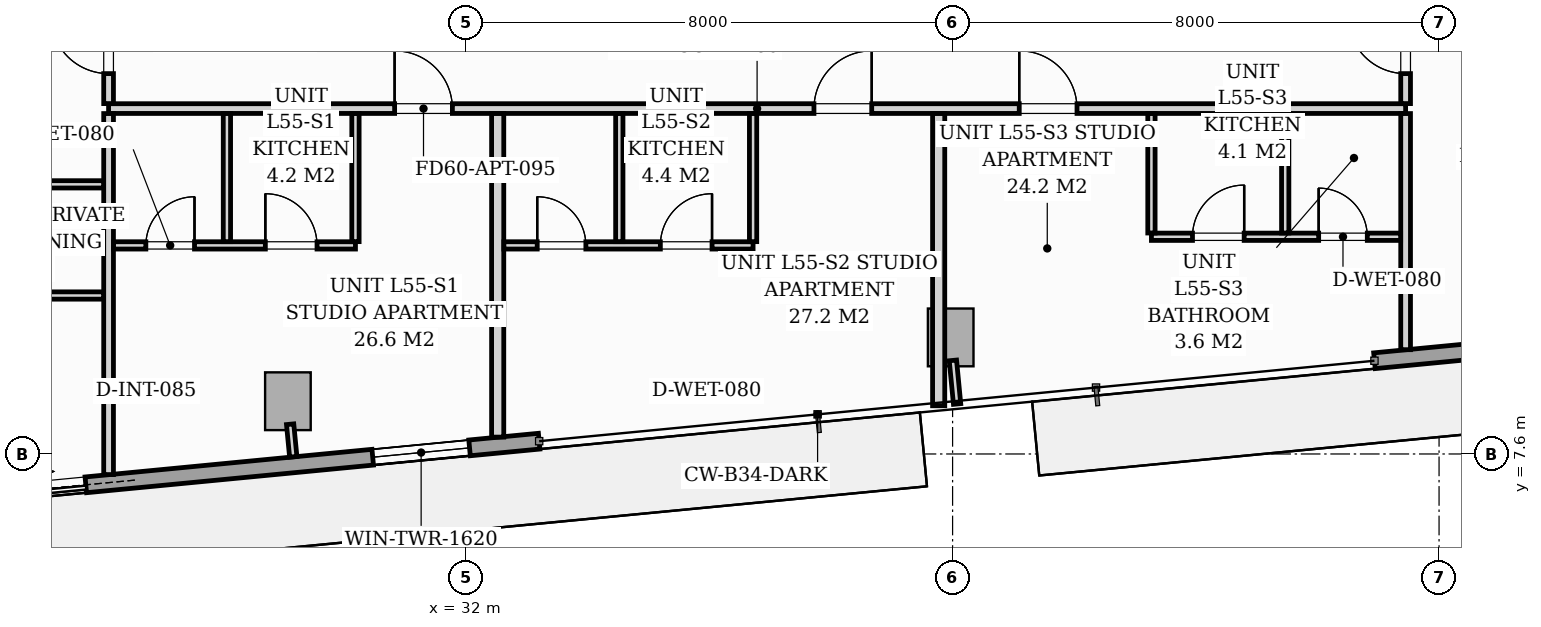
"""IFC4 building model, lengths in metres.
Left out: names, types, materials, properties, quantities, classifications, styles, units other than length and angle.
Written with IfcOpenShell. Run it as: python <this file> out.ifc"""

import sys

from ifc_helpers import new_model, si_unit, direction, frame, frame_2d, origin, origin_2d, place, context, subcontext, project, spatial, rectangle, extrude, source, transform, mapped, element, fill, save


model = new_model("IFC4")
c1 = context("Model", 3, precision=1e-05, world=origin(), true_north=direction((0.0, 1.0)))
c2 = subcontext(c1, "Body", "Model", "MODEL_VIEW")
j1 = project(units=[si_unit("LENGTHUNIT", "METRE"), si_unit("PLANEANGLEUNIT", "RADIAN")], contexts=[c1])
p1 = place(None, origin())
s1 = spatial("IfcSite", under=j1, at=p1, CompositionType="ELEMENT")
p2 = place(p1, origin())
s2 = spatial("IfcBuilding", under=s1, at=p2, CompositionType="ELEMENT")
p3 = place(p2, frame((0.0, 0.0, 192.2)))
s3 = spatial("IfcBuildingStorey", under=s2, at=p3, CompositionType="ELEMENT", Elevation=192.2)
m1 = source(origin(), c2, "Body", "SweptSolid", [
    extrude(rectangle(XDim=0.75, YDim=0.95, at=origin_2d()), origin(), (0.0, 0.0, 1.0), 3.196),
])
for number, where, z_axis, x_axis in (
    (1, (29.069, 8.467, 0.002), (0.0, 0.0, 1.0), (0.995, 0.096, 0.0)),
    (2, (39.969, 9.517, 0.002), (0.0, 0.0, 1.0), (0.995, 0.096, 0.0)),
):
    element("IfcColumn", number, at=place(p3, frame(where, z_axis=z_axis, x_axis=x_axis)), inside=s3, PredefinedType="COLUMN", context=c2, shape_type="MappedRepresentation", body=[
        mapped(m1, transform((0.0, 0.0, 0.0), scale=1.0)),
    ])
p4 = place(p3, frame((62.963, 10.676, 0.0), z_axis=(0.0, 0.0, 1.0), x_axis=(-0.995395627913, -0.095851676732, 0.0)))
e3 = element("IfcWall", 3, at=p4, inside=s3, PredefinedType="STANDARD", context=c2, shape_type="SweptSolid", body=[
    extrude(rectangle(XDim=16.1, YDim=0.26, at=frame_2d((8.05, 0.0))), origin(), (0.0, 0.0, 1.0), 2.94),
])
p5 = place(p4, frame((8.192, 0.0, 0.0)))
e4 = element("IfcOpeningElement", 4, at=p5, cuts=e3, PredefinedType="OPENING", context=c2, shape_type="SweptSolid", body=[
    extrude(rectangle(XDim=1.8, YDim=2.06, at=frame_2d((0.9, 1.03))), frame((0.0, 0.14, 0.0), z_axis=(0.0, -1.0, 0.0), x_axis=(1.0, 0.0, 0.0)), (0.0, 0.0, 1.0), 0.28),
])
p6 = place(p4, frame((2.05, 0.0, 0.65)))
e5 = element("IfcOpeningElement", 5, at=p6, cuts=e3, PredefinedType="OPENING", context=c2, shape_type="SweptSolid", body=[
    extrude(rectangle(XDim=1.6, YDim=1.5, at=frame_2d((0.8, 0.75))), frame((0.0, 0.14, 0.0), z_axis=(0.0, -1.0, 0.0), x_axis=(1.0, 0.0, 0.0)), (0.0, 0.0, 1.0), 0.28),
])
p7 = place(p3, frame((33.201, 7.81, 0.0), z_axis=(0.0, 0.0, 1.0), x_axis=(-0.995397074604, -0.095836652014, 0.0)))
e6 = element("IfcWall", 6, at=p7, inside=s3, PredefinedType="STANDARD", context=c2, shape_type="SweptSolid", body=[
    extrude(rectangle(XDim=16.1, YDim=0.26, at=frame_2d((8.05, 0.0))), origin(), (0.0, 0.0, 1.0), 2.94),
])
p8 = place(p7, frame((7.49, 0.0, 0.0)))
e7 = element("IfcOpeningElement", 7, at=p8, cuts=e6, PredefinedType="OPENING", context=c2, shape_type="SweptSolid", body=[
    extrude(rectangle(XDim=1.8, YDim=2.06, at=frame_2d((0.9, 1.03))), frame((0.0, 0.14, 0.0), z_axis=(0.0, -1.0, 0.0), x_axis=(1.0, 0.0, 0.0)), (0.0, 0.0, 1.0), 0.28),
])
p9 = place(p7, frame((1.15, 0.0, 0.65)))
e8 = element("IfcOpeningElement", 8, at=p9, cuts=e6, PredefinedType="OPENING", context=c2, shape_type="SweptSolid", body=[
    extrude(rectangle(XDim=1.6, YDim=1.5, at=frame_2d((0.8, 0.75))), frame((0.0, 0.14, 0.0), z_axis=(0.0, -1.0, 0.0), x_axis=(1.0, 0.0, 0.0)), (0.0, 0.0, 1.0), 0.28),
])
p10 = place(p3, frame((26.12, 13.28, 0.0), z_axis=(0.0, 0.0, 1.0), x_axis=(1.0, 0.0, 0.0)))
e9 = element("IfcWall", 9, at=p10, inside=s3, PredefinedType="PARTITIONING", context=c2, shape_type="SweptSolid", body=[
    extrude(rectangle(XDim=21.33, YDim=0.16, at=frame_2d((10.665, 0.0))), origin(), (0.0, 0.0, 1.0), 2.94),
])
p11 = place(p10, frame((4.704, 0.0, 0.0)))
e10 = element("IfcOpeningElement", 10, at=p11, cuts=e9, PredefinedType="OPENING", context=c2, shape_type="SweptSolid", body=[
    extrude(rectangle(XDim=0.95, YDim=2.06, at=frame_2d((0.475, 1.03))), frame((0.0, 0.09, 0.0), z_axis=(0.0, -1.0, 0.0), x_axis=(1.0, 0.0, 0.0)), (0.0, 0.0, 1.0), 0.18),
])
p12 = place(p10, frame((11.6, 0.0, 0.0)))
e11 = element("IfcOpeningElement", 11, at=p12, cuts=e9, PredefinedType="OPENING", context=c2, shape_type="SweptSolid", body=[
    extrude(rectangle(XDim=0.95, YDim=2.06, at=frame_2d((0.475, 1.03))), frame((0.0, 0.09, 0.0), z_axis=(0.0, -1.0, 0.0), x_axis=(1.0, 0.0, 0.0)), (0.0, 0.0, 1.0), 0.18),
])
p13 = place(p10, frame((14.976, 0.0, 0.0)))
e12 = element("IfcOpeningElement", 12, at=p13, cuts=e9, PredefinedType="OPENING", context=c2, shape_type="SweptSolid", body=[
    extrude(rectangle(XDim=0.95, YDim=2.06, at=frame_2d((0.475, 1.03))), frame((0.0, 0.09, 0.0), z_axis=(0.0, -1.0, 0.0), x_axis=(1.0, 0.0, 0.0)), (0.0, 0.0, 1.0), 0.18),
])
p14 = place(p3, frame((26.12, 7.261, 0.0), z_axis=(0.0, 0.0, 1.0), x_axis=(0.0, 1.0, 0.0)))
e13 = element("IfcWall", 13, at=p14, inside=s3, PredefinedType="PARTITIONING", context=c2, shape_type="SweptSolid", body=[
    extrude(rectangle(XDim=5.937, YDim=0.16, at=frame_2d((2.968, 0.0))), origin(), (0.0, 0.0, 1.0), 2.94),
])
p15 = place(p3, frame((26.12, 13.362, 0.0), z_axis=(0.0, 0.0, 1.0), x_axis=(0.0, 1.0, 0.0)))
e14 = element("IfcWall", 14, at=p15, inside=s3, PredefinedType="PARTITIONING", context=c2, shape_type="SweptSolid", body=[
    extrude(rectangle(XDim=4.44, YDim=0.16, at=frame_2d((2.22, 0.0))), origin(), (0.0, 0.0, 1.0), 2.94),
])
p16 = place(p15, frame((0.493, 0.0, 0.0)))
e15 = element("IfcOpeningElement", 15, at=p16, cuts=e14, PredefinedType="OPENING", context=c2, shape_type="SweptSolid", body=[
    extrude(rectangle(XDim=0.95, YDim=2.06, at=frame_2d((0.475, 1.03))), frame((0.0, 0.09, 0.0), z_axis=(0.0, -1.0, 0.0), x_axis=(1.0, 0.0, 0.0)), (0.0, 0.0, 1.0), 0.18),
])
p17 = place(p3, frame((47.45, 9.315, 0.0), z_axis=(0.0, 0.0, 1.0), x_axis=(0.0, 1.0, 0.0)))
e16 = element("IfcWall", 16, at=p17, inside=s3, PredefinedType="PARTITIONING", context=c2, shape_type="SweptSolid", body=[
    extrude(rectangle(XDim=3.883, YDim=0.16, at=frame_2d((1.941, 0.0))), origin(), (0.0, 0.0, 1.0), 2.94),
])
p18 = place(p3, frame((47.45, 13.362, 0.0), z_axis=(0.0, 0.0, 1.0), x_axis=(0.0, 1.0, 0.0)))
e17 = element("IfcWall", 17, at=p18, inside=s3, PredefinedType="PARTITIONING", context=c2, shape_type="SweptSolid", body=[
    extrude(rectangle(XDim=7.288, YDim=0.16, at=frame_2d((3.644, 0.0))), origin(), (0.0, 0.0, 1.0), 2.94),
])
p19 = place(p18, frame((0.493, 0.0, 0.0)))
e18 = element("IfcOpeningElement", 18, at=p19, cuts=e17, PredefinedType="OPENING", context=c2, shape_type="SweptSolid", body=[
    extrude(rectangle(XDim=0.95, YDim=2.06, at=frame_2d((0.475, 1.03))), frame((0.0, 0.09, 0.0), z_axis=(0.0, -1.0, 0.0), x_axis=(1.0, 0.0, 0.0)), (0.0, 0.0, 1.0), 0.18),
])
p20 = place(p18, frame((4.783, 0.0, 0.0)))
e19 = element("IfcOpeningElement", 19, at=p20, cuts=e17, PredefinedType="OPENING", context=c2, shape_type="SweptSolid", body=[
    extrude(rectangle(XDim=0.95, YDim=2.06, at=frame_2d((0.475, 1.03))), frame((0.0, 0.09, 0.0), z_axis=(0.0, -1.0, 0.0), x_axis=(1.0, 0.0, 0.0)), (0.0, 0.0, 1.0), 0.18),
])
p21 = place(p3, frame((26.202, 11.03, 0.0), z_axis=(0.0, 0.0, 1.0), x_axis=(1.0, 0.0, 0.0)))
e20 = element("IfcWall", 20, at=p21, inside=s3, PredefinedType="PARTITIONING", context=c2, shape_type="SweptSolid", body=[
    extrude(rectangle(XDim=3.978, YDim=0.12, at=frame_2d((1.989, 0.0))), origin(), (0.0, 0.0, 1.0), 2.94),
])
p22 = place(p21, frame((0.531, 0.0, 0.0)))
e21 = element("IfcOpeningElement", 21, at=p22, cuts=e20, PredefinedType="OPENING", context=c2, shape_type="SweptSolid", body=[
    extrude(rectangle(XDim=0.8, YDim=2.02, at=frame_2d((0.4, 1.01))), frame((0.0, 0.07, 0.0), z_axis=(0.0, -1.0, 0.0), x_axis=(1.0, 0.0, 0.0)), (0.0, 0.0, 1.0), 0.14),
])
p23 = place(p21, frame((2.496, 0.0, 0.0)))
e22 = element("IfcOpeningElement", 22, at=p23, cuts=e20, PredefinedType="OPENING", context=c2, shape_type="SweptSolid", body=[
    extrude(rectangle(XDim=0.85, YDim=2.05, at=frame_2d((0.425, 1.025))), frame((0.0, 0.07, 0.0), z_axis=(0.0, -1.0, 0.0), x_axis=(1.0, 0.0, 0.0)), (0.0, 0.0, 1.0), 0.14),
])
for number, where, z_axis, x_axis in (
    (23, (30.18, 11.092, 0.0), (0.0, 0.0, 1.0), (0.0, 1.0, 0.0)),
    (24, (28.066, 11.092, 0.0), (0.0, 0.0, 1.0), (0.0, 1.0, 0.0)),
):
    element("IfcWall", number, at=place(p3, frame(where, z_axis=z_axis, x_axis=x_axis)), inside=s3, PredefinedType="PARTITIONING", context=c2, shape_type="SweptSolid", body=[
        extrude(rectangle(XDim=2.106, YDim=0.12, at=frame_2d((1.053, 0.0))), origin(), (0.0, 0.0, 1.0), 2.94),
    ])
p24 = place(p3, frame((32.519, 7.877, 0.0), z_axis=(0.0, 0.0, 1.0), x_axis=(0.0, 1.0, 0.0)))
e25 = element("IfcWall", 25, at=p24, inside=s3, PredefinedType="PARTITIONING", context=c2, shape_type="SweptSolid", body=[
    extrude(rectangle(XDim=5.321, YDim=0.2, at=frame_2d((2.66, 0.0))), origin(), (0.0, 0.0, 1.0), 2.94),
])
p25 = place(p3, frame((32.621, 11.03, 0.0), z_axis=(0.0, 0.0, 1.0), x_axis=(1.0, 0.0, 0.0)))
e26 = element("IfcWall", 26, at=p25, inside=s3, PredefinedType="PARTITIONING", context=c2, shape_type="SweptSolid", body=[
    extrude(rectangle(XDim=4.098, YDim=0.12, at=frame_2d((2.049, 0.0))), origin(), (0.0, 0.0, 1.0), 2.94),
])
p26 = place(p25, frame((0.548, 0.0, 0.0)))
e27 = element("IfcOpeningElement", 27, at=p26, cuts=e26, PredefinedType="OPENING", context=c2, shape_type="SweptSolid", body=[
    extrude(rectangle(XDim=0.8, YDim=2.02, at=frame_2d((0.4, 1.01))), frame((0.0, 0.07, 0.0), z_axis=(0.0, -1.0, 0.0), x_axis=(1.0, 0.0, 0.0)), (0.0, 0.0, 1.0), 0.14),
])
p27 = place(p25, frame((2.573, 0.0, 0.0)))
e28 = element("IfcOpeningElement", 28, at=p27, cuts=e26, PredefinedType="OPENING", context=c2, shape_type="SweptSolid", body=[
    extrude(rectangle(XDim=0.85, YDim=2.05, at=frame_2d((0.425, 1.025))), frame((0.0, 0.07, 0.0), z_axis=(0.0, -1.0, 0.0), x_axis=(1.0, 0.0, 0.0)), (0.0, 0.0, 1.0), 0.14),
])
for number, where, z_axis, x_axis in (
    (29, (36.719, 11.092, 0.0), (0.0, 0.0, 1.0), (0.0, 1.0, 0.0)),
    (30, (34.519, 11.092, 0.0), (0.0, 0.0, 1.0), (0.0, 1.0, 0.0)),
):
    element("IfcWall", number, at=place(p3, frame(where, z_axis=z_axis, x_axis=x_axis)), inside=s3, PredefinedType="PARTITIONING", context=c2, shape_type="SweptSolid", body=[
        extrude(rectangle(XDim=2.106, YDim=0.12, at=frame_2d((1.053, 0.0))), origin(), (0.0, 0.0, 1.0), 2.94),
    ])
p28 = place(p3, frame((39.771, 8.393, 0.0), z_axis=(0.0, 0.0, 1.0), x_axis=(0.0, 1.0, 0.0)))
e31 = element("IfcWall", 31, at=p28, inside=s3, PredefinedType="PARTITIONING", context=c2, shape_type="SweptSolid", body=[
    extrude(rectangle(XDim=4.805, YDim=0.2, at=frame_2d((2.403, 0.0))), origin(), (0.0, 0.0, 1.0), 2.94),
])
p29 = place(p3, frame((43.27, 11.172, 0.0), z_axis=(0.0, 0.0, 1.0), x_axis=(1.0, 0.0, 0.0)))
e32 = element("IfcWall", 32, at=p29, inside=s3, PredefinedType="PARTITIONING", context=c2, shape_type="SweptSolid", body=[
    extrude(rectangle(XDim=4.098, YDim=0.12, at=frame_2d((2.049, 0.0))), origin(), (0.0, 0.0, 1.0), 2.94),
])
p30 = place(p29, frame((0.675, 0.0, 0.0)))
e33 = element("IfcOpeningElement", 33, at=p30, cuts=e32, PredefinedType="OPENING", context=c2, shape_type="SweptSolid", body=[
    extrude(rectangle(XDim=0.85, YDim=2.05, at=frame_2d((0.425, 1.025))), frame((0.0, 0.07, 0.0), z_axis=(0.0, -1.0, 0.0), x_axis=(1.0, 0.0, 0.0)), (0.0, 0.0, 1.0), 0.14),
])
p31 = place(p29, frame((2.75, 0.0, 0.0)))
e34 = element("IfcOpeningElement", 34, at=p31, cuts=e32, PredefinedType="OPENING", context=c2, shape_type="SweptSolid", body=[
    extrude(rectangle(XDim=0.8, YDim=2.02, at=frame_2d((0.4, 1.01))), frame((0.0, 0.07, 0.0), z_axis=(0.0, -1.0, 0.0), x_axis=(1.0, 0.0, 0.0)), (0.0, 0.0, 1.0), 0.14),
])
for number, where, z_axis, x_axis in (
    (35, (43.27, 11.234, 0.0), (0.0, 0.0, 1.0), (0.0, 1.0, 0.0)),
    (36, (45.47, 11.234, 0.0), (0.0, 0.0, 1.0), (0.0, 1.0, 0.0)),
):
    element("IfcWall", number, at=place(p3, frame(where, z_axis=z_axis, x_axis=x_axis)), inside=s3, PredefinedType="PARTITIONING", context=c2, shape_type="SweptSolid", body=[
        extrude(rectangle(XDim=1.964, YDim=0.12, at=frame_2d((0.982, 0.0))), origin(), (0.0, 0.0, 1.0), 2.94),
    ])
p32 = place(p3, frame((14.365, 10.206, 0.0), z_axis=(0.0, 0.0, 1.0), x_axis=(1.0, 0.0, 0.0)))
e37 = element("IfcWall", 37, at=p32, inside=s3, PredefinedType="PARTITIONING", context=c2, shape_type="SweptSolid", body=[
    extrude(rectangle(XDim=11.673, YDim=0.12, at=frame_2d((5.837, 0.0))), origin(), (0.0, 0.0, 1.0), 2.94),
])
p33 = place(p32, frame((5.405, 0.0, 0.0)))
e38 = element("IfcOpeningElement", 38, at=p33, cuts=e37, PredefinedType="OPENING", context=c2, shape_type="SweptSolid", body=[
    extrude(rectangle(XDim=0.85, YDim=2.05, at=frame_2d((0.425, 1.025))), frame((0.0, 0.07, 0.0), z_axis=(0.0, -1.0, 0.0), x_axis=(1.0, 0.0, 0.0)), (0.0, 0.0, 1.0), 0.14),
])
p34 = place(p3, frame((14.189, 12.034, 0.0), z_axis=(0.0, 0.0, 1.0), x_axis=(1.0, 0.0, 0.0)))
e39 = element("IfcWall", 39, at=p34, inside=s3, PredefinedType="PARTITIONING", context=c2, shape_type="SweptSolid", body=[
    extrude(rectangle(XDim=11.849, YDim=0.12, at=frame_2d((5.925, 0.0))), origin(), (0.0, 0.0, 1.0), 2.94),
])
p35 = place(p34, frame((5.493, 0.0, 0.0)))
e40 = element("IfcOpeningElement", 40, at=p35, cuts=e39, PredefinedType="OPENING", context=c2, shape_type="SweptSolid", body=[
    extrude(rectangle(XDim=0.85, YDim=2.05, at=frame_2d((0.425, 1.025))), frame((0.0, 0.07, 0.0), z_axis=(0.0, -1.0, 0.0), x_axis=(1.0, 0.0, 0.0)), (0.0, 0.0, 1.0), 0.14),
])
p36 = place(p3, frame((29.105, 8.089, 0.0), z_axis=(0.0, 0.0, 1.0), x_axis=(0.095772948675, -0.995403205893, 0.0)))
e41 = element("IfcWall", 41, at=p36, inside=s3, PredefinedType="PARTITIONING", context=c2, shape_type="SweptSolid", body=[
    extrude(rectangle(XDim=0.538, YDim=0.12, at=frame_2d((0.269, 0.0))), origin(), (0.0, 0.0, 1.0), 2.94),
])
p37 = place(p3, frame((40.005, 9.139, 0.0), z_axis=(0.0, 0.0, 1.0), x_axis=(0.095977354523, -0.995383517755, 0.0)))
e42 = element("IfcWall", 42, at=p37, inside=s3, PredefinedType="PARTITIONING", context=c2, shape_type="SweptSolid", body=[
    extrude(rectangle(XDim=0.72, YDim=0.12, at=frame_2d((0.36, 0.0))), origin(), (0.0, 0.0, 1.0), 2.94),
])
m2 = source(origin(), c2, "Body", "SweptSolid", [
    extrude(rectangle(XDim=1.8, YDim=2.06, at=frame_2d((0.9, 1.03))), frame((0.0, 0.025, 0.0), z_axis=(0.0, -1.0, 0.0), x_axis=(1.0, 0.0, 0.0)), (0.0, 0.0, 1.0), 0.05),
])
p38 = place(p8, origin())
e43 = element("IfcDoor", 43, at=p38, inside=s3, OperationType="SLIDING_TO_LEFT", PredefinedType="DOOR", context=c2, shape_type="MappedRepresentation", body=[
    mapped(m2, transform((0.0, 0.0, 0.0), scale=1.0)),
])
fill(e7, e43)
m3 = source(origin(), c2, "Body", "SweptSolid", [
    extrude(rectangle(XDim=1.6, YDim=1.5, at=frame_2d((0.8, 0.75))), frame((0.0, 0.03, 0.0), z_axis=(0.0, -1.0, 0.0), x_axis=(1.0, 0.0, 0.0)), (0.0, 0.0, 1.0), 0.06),
])
p39 = place(p9, origin())
e44 = element("IfcWindow", 44, at=p39, inside=s3, PartitioningType="SINGLE_PANEL", PredefinedType="WINDOW", context=c2, shape_type="MappedRepresentation", body=[
    mapped(m3, transform((0.0, 0.0, 0.0), scale=1.0)),
])
fill(e8, e44)
m4 = source(origin(), c2, "Body", "SweptSolid", [
    extrude(rectangle(XDim=0.95, YDim=2.06, at=frame_2d((0.475, 1.03))), frame((0.0, 0.025, 0.0), z_axis=(0.0, -1.0, 0.0), x_axis=(1.0, 0.0, 0.0)), (0.0, 0.0, 1.0), 0.05),
])
p40 = place(p11, origin())
e45 = element("IfcDoor", 45, at=p40, inside=s3, OperationType="SINGLE_SWING_LEFT", PredefinedType="DOOR", context=c2, shape_type="MappedRepresentation", body=[
    mapped(m4, transform((0.0, 0.0, 0.0), scale=1.0)),
])
fill(e10, e45)
m5 = source(origin(), c2, "Body", "SweptSolid", [
    extrude(rectangle(XDim=0.8, YDim=2.02, at=frame_2d((0.4, 1.01))), frame((0.0, 0.025, 0.0), z_axis=(0.0, -1.0, 0.0), x_axis=(1.0, 0.0, 0.0)), (0.0, 0.0, 1.0), 0.05),
])
p41 = place(p22, origin())
e46 = element("IfcDoor", 46, at=p41, inside=s3, OperationType="SINGLE_SWING_RIGHT", PredefinedType="DOOR", context=c2, shape_type="MappedRepresentation", body=[
    mapped(m5, transform((0.0, 0.0, 0.0), scale=1.0)),
])
fill(e21, e46)
m6 = source(origin(), c2, "Body", "SweptSolid", [
    extrude(rectangle(XDim=0.85, YDim=2.05, at=frame_2d((0.425, 1.025))), frame((0.0, 0.025, 0.0), z_axis=(0.0, -1.0, 0.0), x_axis=(1.0, 0.0, 0.0)), (0.0, 0.0, 1.0), 0.05),
])
p42 = place(p23, origin())
e47 = element("IfcDoor", 47, at=p42, inside=s3, OperationType="SINGLE_SWING_LEFT", PredefinedType="DOOR", context=c2, shape_type="MappedRepresentation", body=[
    mapped(m6, transform((0.0, 0.0, 0.0), scale=1.0)),
])
fill(e22, e47)
p43 = place(p12, origin())
e48 = element("IfcDoor", 48, at=p43, inside=s3, OperationType="SINGLE_SWING_RIGHT", PredefinedType="DOOR", context=c2, shape_type="MappedRepresentation", body=[
    mapped(m4, transform((0.0, 0.0, 0.0), scale=1.0)),
])
fill(e11, e48)
p44 = place(p26, origin())
e49 = element("IfcDoor", 49, at=p44, inside=s3, OperationType="SINGLE_SWING_LEFT", PredefinedType="DOOR", context=c2, shape_type="MappedRepresentation", body=[
    mapped(m5, transform((0.0, 0.0, 0.0), scale=1.0)),
])
fill(e27, e49)
p45 = place(p27, origin())
e50 = element("IfcDoor", 50, at=p45, inside=s3, OperationType="SINGLE_SWING_RIGHT", PredefinedType="DOOR", context=c2, shape_type="MappedRepresentation", body=[
    mapped(m6, transform((0.0, 0.0, 0.0), scale=1.0)),
])
fill(e28, e50)
p46 = place(p13, origin())
e51 = element("IfcDoor", 51, at=p46, inside=s3, OperationType="SINGLE_SWING_LEFT", PredefinedType="DOOR", context=c2, shape_type="MappedRepresentation", body=[
    mapped(m4, transform((0.0, 0.0, 0.0), scale=1.0)),
])
fill(e12, e51)
p47 = place(p30, origin())
e52 = element("IfcDoor", 52, at=p47, inside=s3, OperationType="SINGLE_SWING_RIGHT", PredefinedType="DOOR", context=c2, shape_type="MappedRepresentation", body=[
    mapped(m6, transform((0.0, 0.0, 0.0), scale=1.0)),
])
fill(e33, e52)
p48 = place(p31, origin())
e53 = element("IfcDoor", 53, at=p48, inside=s3, OperationType="SINGLE_SWING_LEFT", PredefinedType="DOOR", context=c2, shape_type="MappedRepresentation", body=[
    mapped(m5, transform((0.0, 0.0, 0.0), scale=1.0)),
])
fill(e34, e53)
p49 = place(p16, origin())
e54 = element("IfcDoor", 54, at=p49, inside=s3, OperationType="SINGLE_SWING_RIGHT", PredefinedType="DOOR", context=c2, shape_type="MappedRepresentation", body=[
    mapped(m4, transform((0.0, 0.0, 0.0), scale=1.0)),
])
fill(e15, e54)
p50 = place(p19, origin())
e55 = element("IfcDoor", 55, at=p50, inside=s3, OperationType="SINGLE_SWING_RIGHT", PredefinedType="DOOR", context=c2, shape_type="MappedRepresentation", body=[
    mapped(m4, transform((0.0, 0.0, 0.0), scale=1.0)),
])
fill(e18, e55)
save(model, sys.argv[1])
